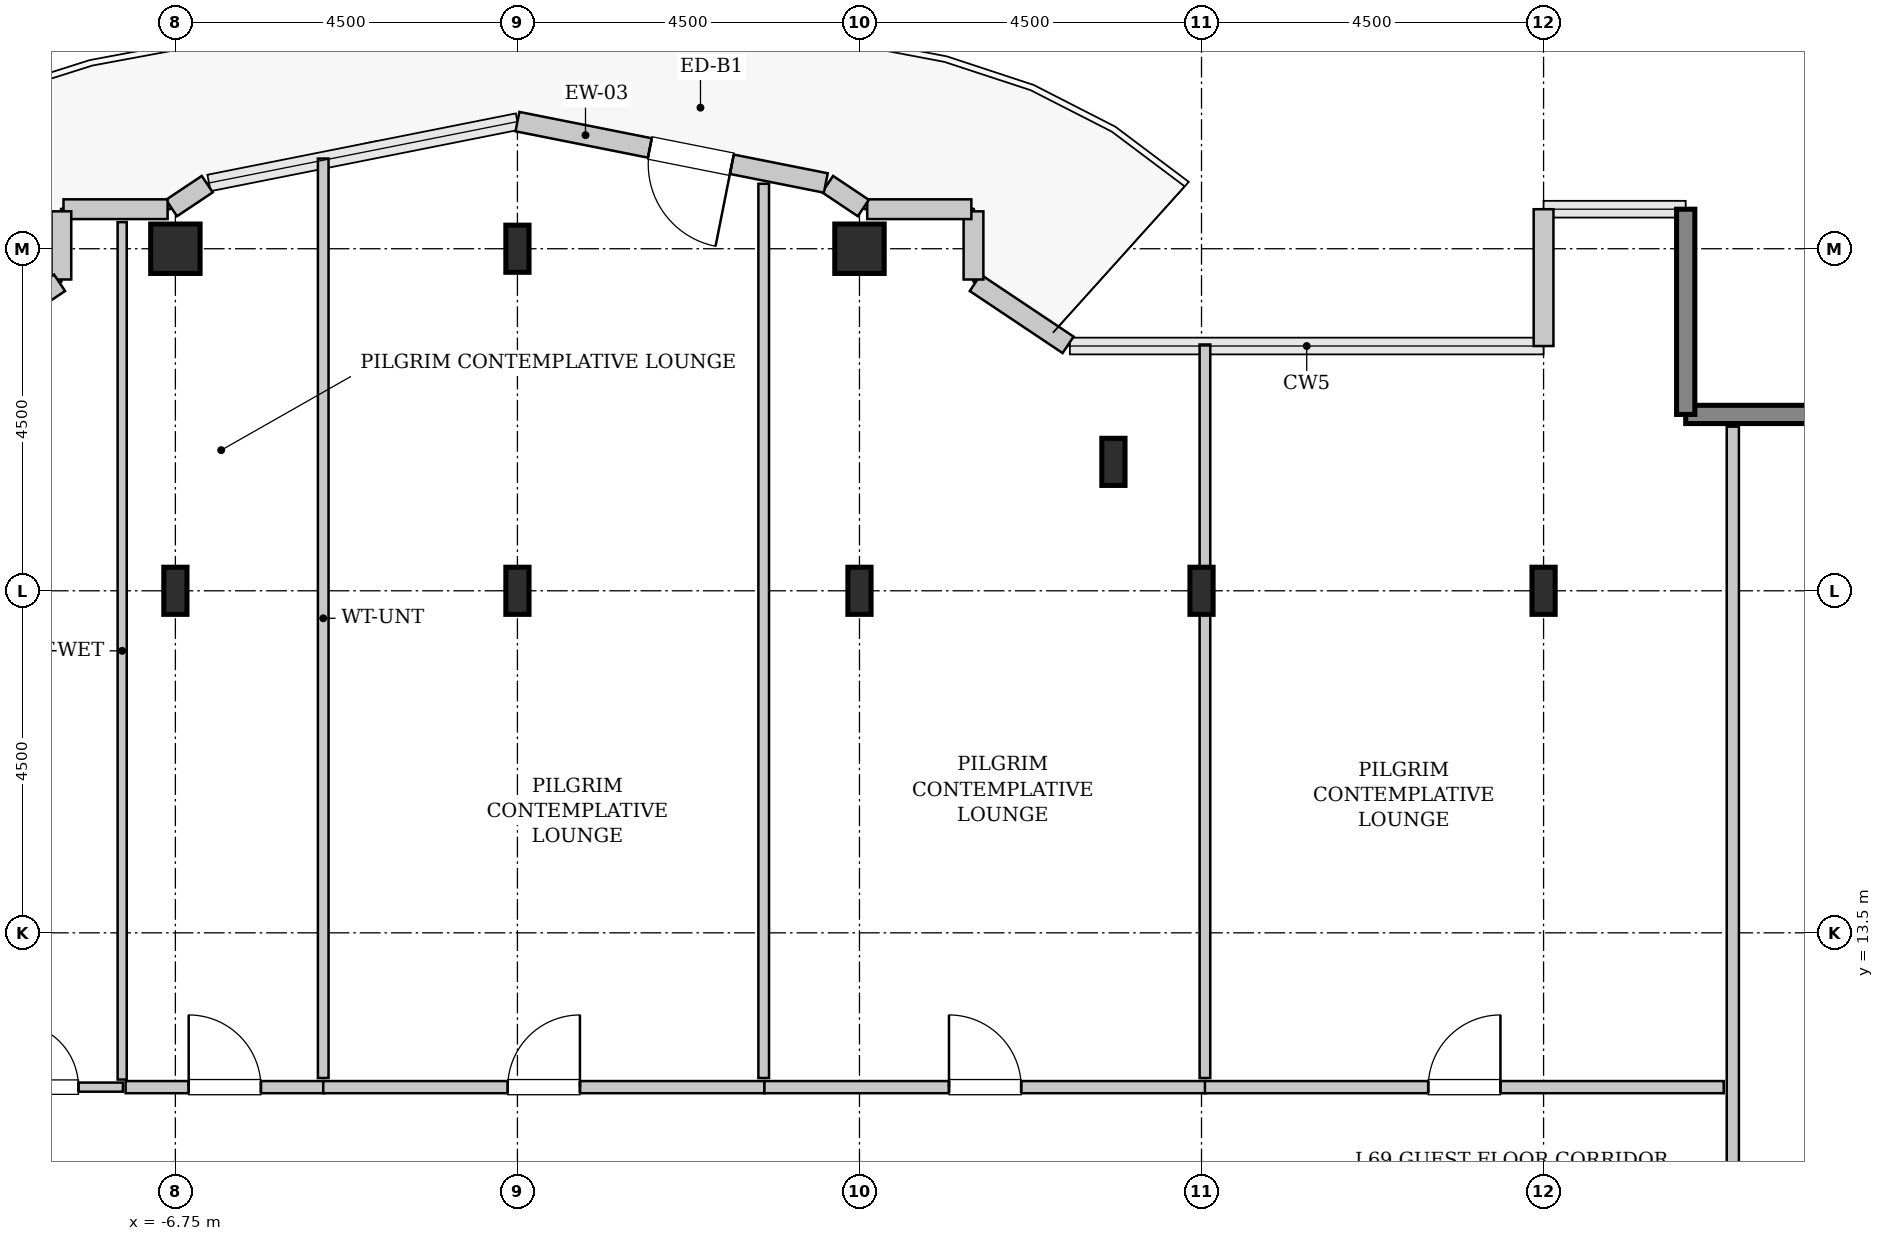
"""IFC4 building model, lengths in metres.
Left out: names, types, materials, properties, quantities, classifications, styles, units other than length and angle.
Written with IfcOpenShell. Run it as: python <this file> out.ifc"""

import sys

from ifc_helpers import new_model, si_unit, direction, frame, frame_2d, origin, origin_2d, place, context, subcontext, project, spatial, rectangle, hollow_rectangle, i_section, extrude, source, transform, mapped, element, fill, save


model = new_model("IFC4")
c1 = context("Model", 3, precision=1e-05, world=origin(), true_north=direction((0.0, 1.0)))
c2 = subcontext(c1, "Body", "Model", "MODEL_VIEW")
j1 = project(units=[si_unit("LENGTHUNIT", "METRE"), si_unit("PLANEANGLEUNIT", "RADIAN")], contexts=[c1])
p1 = place(None, origin())
s1 = spatial("IfcSite", under=j1, at=p1, CompositionType="ELEMENT")
p2 = place(p1, origin())
s2 = spatial("IfcBuilding", under=s1, at=p2, CompositionType="ELEMENT")
p3 = place(p2, frame((0.0, 0.0, 276.0)))
s3 = spatial("IfcBuildingStorey", under=s2, at=p3, CompositionType="ELEMENT", Elevation=276.0)
m1 = source(origin(), c2, "Body", "SweptSolid", [
    extrude(i_section(OverallWidth=0.305, OverallDepth=0.62, WebThickness=0.021, FlangeThickness=0.04, FilletRadius=0.027, at=origin_2d()), origin(), (0.0, 0.0, 1.0), 3.8),
])
p4 = place(p3, frame((-6.75, 18.0, 0.0), z_axis=(0.0, 0.0, 1.0), x_axis=(1.0, 0.0, 0.0)))
e1 = element("IfcColumn", 1, at=p4, inside=s3, PredefinedType="COLUMN", context=c2, shape_type="MappedRepresentation", body=[
    mapped(m1, transform((0.0, 0.0, 0.0), x_axis=(1.0, 0.0, 0.0), y_axis=(0.0, 1.0, 0.0), z_axis=(0.0, 0.0, 1.0), scale=1.0)),
])
m2 = source(origin(), c2, "Body", "SweptSolid", [
    extrude(hollow_rectangle(XDim=0.65, YDim=0.65, WallThickness=0.032, InnerFilletRadius=0.032, OuterFilletRadius=0.064, at=origin_2d()), origin(), (0.0, 0.0, 1.0), 3.8),
])
p5 = place(p3, frame((-6.75, 22.5, 0.0), z_axis=(0.0, 0.0, 1.0), x_axis=(1.0, 0.0, 0.0)))
e2 = element("IfcColumn", 2, at=p5, inside=s3, PredefinedType="COLUMN", context=c2, shape_type="MappedRepresentation", body=[
    mapped(m2, transform((0.0, 0.0, 0.0), x_axis=(1.0, 0.0, 0.0), y_axis=(0.0, 1.0, 0.0), z_axis=(0.0, 0.0, 1.0), scale=1.0)),
])
for number, where, z_axis, x_axis in (
    (3, (-2.25, 18.0, 0.0), (0.0, 0.0, 1.0), (1.0, 0.0, 0.0)),
    (4, (-2.25, 22.5, 0.0), (0.0, 0.0, 1.0), (1.0, 0.0, 0.0)),
    (5, (2.25, 18.0, 0.0), (0.0, 0.0, 1.0), (1.0, 0.0, 0.0)),
):
    element("IfcColumn", number, at=place(p3, frame(where, z_axis=z_axis, x_axis=x_axis)), inside=s3, PredefinedType="COLUMN", context=c2, shape_type="MappedRepresentation", body=[
        mapped(m1, transform((0.0, 0.0, 0.0), x_axis=(1.0, 0.0, 0.0), y_axis=(0.0, 1.0, 0.0), z_axis=(0.0, 0.0, 1.0), scale=1.0)),
    ])
p6 = place(p3, frame((2.25, 22.5, 0.0), z_axis=(0.0, 0.0, 1.0), x_axis=(1.0, 0.0, 0.0)))
e6 = element("IfcColumn", 6, at=p6, inside=s3, PredefinedType="COLUMN", context=c2, shape_type="MappedRepresentation", body=[
    mapped(m2, transform((0.0, 0.0, 0.0), x_axis=(1.0, 0.0, 0.0), y_axis=(0.0, 1.0, 0.0), z_axis=(0.0, 0.0, 1.0), scale=1.0)),
])
for number, where, z_axis, x_axis in (
    (7, (5.591, 19.696, 0.0), (0.0, 0.0, 1.0), (1.0, 0.0, 0.0)),
    (8, (6.75, 18.0, 0.0), (0.0, 0.0, 1.0), (1.0, 0.0, 0.0)),
    (9, (11.25, 18.0, 0.0), (0.0, 0.0, 1.0), (1.0, 0.0, 0.0)),
):
    element("IfcColumn", number, at=place(p3, frame(where, z_axis=z_axis, x_axis=x_axis)), inside=s3, PredefinedType="COLUMN", context=c2, shape_type="MappedRepresentation", body=[
        mapped(m1, transform((0.0, 0.0, 0.0), x_axis=(1.0, 0.0, 0.0), y_axis=(0.0, 1.0, 0.0), z_axis=(0.0, 0.0, 1.0), scale=1.0)),
    ])
m3 = source(origin(), c2, "Body", "SweptSolid", [
    extrude(rectangle(XDim=2.7, YDim=0.24, at=frame_2d((1.35, 0.0))), origin(), (0.0, 0.0, 1.0), 3.55),
])
for number, where, z_axis, x_axis in (
    (10, (15.82, 20.32, 0.0), (0.0, 0.0, 1.0), (-1.0, 0.0, 0.0)),
    (11, (13.12, 20.32, 0.0), (0.0, 0.0, 1.0), (0.0, 1.0, 0.0)),
):
    element("IfcWall", number, at=place(p3, frame(where, z_axis=z_axis, x_axis=x_axis)), inside=s3, PredefinedType="SHEAR", context=c2, shape_type="MappedRepresentation", body=[
        mapped(m3, transform((0.0, 0.0, 0.0), x_axis=(1.0, 0.0, 0.0), y_axis=(0.0, 1.0, 0.0), z_axis=(0.0, 0.0, 1.0), scale=1.0)),
    ])
m4 = source(origin(), c2, "Body", "SweptSolid", [
    extrude(rectangle(XDim=1.8, YDim=0.26, at=frame_2d((0.9, 0.0))), origin(), (0.0, 0.0, 1.0), 3.55),
])
p7 = place(p3, frame((11.25, 23.02, 0.0), z_axis=(0.0, 0.0, 1.0), x_axis=(0.0, -1.0, 0.0)))
e12 = element("IfcWall", 12, at=p7, inside=s3, PredefinedType="SOLIDWALL", context=c2, shape_type="MappedRepresentation", body=[
    mapped(m4, transform((0.0, 0.0, 0.0), x_axis=(1.0, 0.0, 0.0), y_axis=(0.0, 1.0, 0.0), z_axis=(0.0, 0.0, 1.0), scale=1.0)),
])
m5 = source(origin(), c2, "Body", "SweptSolid", [
    extrude(rectangle(XDim=1.469, YDim=0.26, at=frame_2d((0.734, 0.0))), origin(), (0.0, 0.0, 1.0), 3.55),
])
p8 = place(p3, frame((4.995, 21.236, 0.0), z_axis=(0.0, 0.0, 1.0), x_axis=(-0.831461760506, 0.555581983884, 0.0)))
e13 = element("IfcWall", 13, at=p8, inside=s3, PredefinedType="SOLIDWALL", context=c2, shape_type="MappedRepresentation", body=[
    mapped(m5, transform((0.0, 0.0, 0.0), x_axis=(1.0, 0.0, 0.0), y_axis=(0.0, 1.0, 0.0), z_axis=(0.0, 0.0, 1.0), scale=1.0)),
])
m6 = source(origin(), c2, "Body", "SweptSolid", [
    extrude(rectangle(XDim=0.897, YDim=0.26, at=frame_2d((0.448, 0.0))), origin(), (0.0, 0.0, 1.0), 3.55),
])
p9 = place(p3, frame((3.75, 22.095, 0.0), z_axis=(0.0, 0.0, 1.0), x_axis=(0.0, 1.0, 0.0)))
e14 = element("IfcWall", 14, at=p9, inside=s3, PredefinedType="SOLIDWALL", context=c2, shape_type="MappedRepresentation", body=[
    mapped(m6, transform((0.0, 0.0, 0.0), x_axis=(1.0, 0.0, 0.0), y_axis=(0.0, 1.0, 0.0), z_axis=(0.0, 0.0, 1.0), scale=1.0)),
])
m7 = source(origin(), c2, "Body", "SweptSolid", [
    extrude(rectangle(XDim=1.37, YDim=0.26, at=frame_2d((0.685, 0.0))), origin(), (0.0, 0.0, 1.0), 3.55),
])
p10 = place(p3, frame((3.722, 23.02, 0.0), z_axis=(0.0, 0.0, 1.0), x_axis=(-1.0, 0.0, 0.0)))
e15 = element("IfcWall", 15, at=p10, inside=s3, PredefinedType="SOLIDWALL", context=c2, shape_type="MappedRepresentation", body=[
    mapped(m7, transform((0.0, 0.0, 0.0), x_axis=(1.0, 0.0, 0.0), y_axis=(0.0, 1.0, 0.0), z_axis=(0.0, 0.0, 1.0), scale=1.0)),
])
m8 = source(origin(), c2, "Body", "SweptSolid", [
    extrude(rectangle(XDim=0.565, YDim=0.26, at=frame_2d((0.283, 0.0))), origin(), (0.0, 0.0, 1.0), 3.55),
])
p11 = place(p3, frame((2.301, 23.036, 0.0), z_axis=(0.0, 0.0, 1.0), x_axis=(-0.831651492666, 0.555297933317, 0.0)))
e16 = element("IfcWall", 16, at=p11, inside=s3, PredefinedType="SOLIDWALL", context=c2, shape_type="MappedRepresentation", body=[
    mapped(m8, transform((0.0, 0.0, 0.0), x_axis=(1.0, 0.0, 0.0), y_axis=(0.0, 1.0, 0.0), z_axis=(0.0, 0.0, 1.0), scale=1.0)),
])
m9 = source(origin(), c2, "Body", "SweptSolid", [
    extrude(rectangle(XDim=4.137, YDim=0.26, at=frame_2d((2.068, 0.0))), origin(), (0.0, 0.0, 1.0), 3.55),
])
p12 = place(p3, frame((1.807, 23.365, 0.0), z_axis=(0.0, 0.0, 1.0), x_axis=(-0.980782170794, 0.195105954428, 0.0)))
e17 = element("IfcWall", 17, at=p12, inside=s3, PredefinedType="SOLIDWALL", context=c2, shape_type="MappedRepresentation", body=[
    mapped(m9, transform((0.0, 0.0, 0.0), x_axis=(1.0, 0.0, 0.0), y_axis=(0.0, 1.0, 0.0), z_axis=(0.0, 0.0, 1.0), scale=1.0)),
])
p13 = place(p12, frame((1.261, 0.0, 0.0)))
e18 = element("IfcOpeningElement", 18, at=p13, cuts=e17, PredefinedType="OPENING", context=c2, shape_type="SweptSolid", body=[
    extrude(rectangle(XDim=1.1, YDim=2.2, at=frame_2d((0.55, 1.1))), frame((0.0, 0.14, 0.0), z_axis=(0.0, -1.0, 0.0), x_axis=(1.0, 0.0, 0.0)), (0.0, 0.0, 1.0), 0.28),
])
p14 = place(p3, frame((-6.331, 23.35, 0.0), z_axis=(0.0, 0.0, 1.0), x_axis=(-0.831651492666, -0.555297933317, 0.0)))
e19 = element("IfcWall", 19, at=p14, inside=s3, PredefinedType="SOLIDWALL", context=c2, shape_type="MappedRepresentation", body=[
    mapped(m8, transform((0.0, 0.0, 0.0), x_axis=(1.0, 0.0, 0.0), y_axis=(0.0, 1.0, 0.0), z_axis=(0.0, 0.0, 1.0), scale=1.0)),
])
p15 = place(p3, frame((-6.852, 23.02, 0.0), z_axis=(0.0, 0.0, 1.0), x_axis=(-1.0, 0.0, 0.0)))
e20 = element("IfcWall", 20, at=p15, inside=s3, PredefinedType="SOLIDWALL", context=c2, shape_type="MappedRepresentation", body=[
    mapped(m7, transform((0.0, 0.0, 0.0), x_axis=(1.0, 0.0, 0.0), y_axis=(0.0, 1.0, 0.0), z_axis=(0.0, 0.0, 1.0), scale=1.0)),
])
p16 = place(p3, frame((-8.25, 22.992, 0.0), z_axis=(0.0, 0.0, 1.0), x_axis=(0.0, -1.0, 0.0)))
e21 = element("IfcWall", 21, at=p16, inside=s3, PredefinedType="SOLIDWALL", context=c2, shape_type="MappedRepresentation", body=[
    mapped(m6, transform((0.0, 0.0, 0.0), x_axis=(1.0, 0.0, 0.0), y_axis=(0.0, 1.0, 0.0), z_axis=(0.0, 0.0, 1.0), scale=1.0)),
])
p17 = place(p3, frame((-8.273, 22.052, 0.0), z_axis=(0.0, 0.0, 1.0), x_axis=(-0.831461760506, -0.555581983884, 0.0)))
e22 = element("IfcWall", 22, at=p17, inside=s3, PredefinedType="SOLIDWALL", context=c2, shape_type="MappedRepresentation", body=[
    mapped(m5, transform((0.0, 0.0, 0.0), x_axis=(1.0, 0.0, 0.0), y_axis=(0.0, 1.0, 0.0), z_axis=(0.0, 0.0, 1.0), scale=1.0)),
])
m10 = source(origin(), c2, "Body", "SweptSolid", [
    extrude(rectangle(XDim=2.02, YDim=0.12, at=frame_2d((1.01, 0.0))), origin(), (0.0, 0.0, 1.0), 3.535),
])
p18 = place(p3, frame((-9.46, 11.47, 0.0), z_axis=(0.0, 0.0, 1.0), x_axis=(1.0, 0.0, 0.0)))
e23 = element("IfcWall", 23, at=p18, inside=s3, PredefinedType="PLUMBINGWALL", context=c2, shape_type="MappedRepresentation", body=[
    mapped(m10, transform((0.0, 0.0, 0.0), x_axis=(1.0, 0.0, 0.0), y_axis=(0.0, 1.0, 0.0), z_axis=(0.0, 0.0, 1.0), scale=1.0)),
])
p19 = place(p18, frame((0.585, 0.0, 0.0)))
e24 = element("IfcOpeningElement", 24, at=p19, cuts=e23, PredefinedType="OPENING", context=c2, shape_type="SweptSolid", body=[
    extrude(rectangle(XDim=0.85, YDim=2.1, at=frame_2d((0.425, 1.05))), frame((0.0, 0.07, 0.0), z_axis=(0.0, -1.0, 0.0), x_axis=(1.0, 0.0, 0.0)), (0.0, 0.0, 1.0), 0.14),
])
m11 = source(origin(), c2, "Body", "SweptSolid", [
    extrude(rectangle(XDim=11.28, YDim=0.12, at=frame_2d((5.64, 0.0))), origin(), (0.0, 0.0, 1.0), 3.535),
])
p20 = place(p3, frame((-7.45, 11.57, 0.0), z_axis=(0.0, 0.0, 1.0), x_axis=(0.0, 1.0, 0.0)))
e25 = element("IfcWall", 25, at=p20, inside=s3, PredefinedType="PLUMBINGWALL", context=c2, shape_type="MappedRepresentation", body=[
    mapped(m11, transform((0.0, 0.0, 0.0), x_axis=(1.0, 0.0, 0.0), y_axis=(0.0, 1.0, 0.0), z_axis=(0.0, 0.0, 1.0), scale=1.0)),
])
m12 = source(origin(), c2, "Body", "SweptSolid", [
    extrude(rectangle(XDim=13.965, YDim=0.16, at=frame_2d((6.982, 0.0))), origin(), (0.0, 0.0, 1.0), 3.535),
])
p21 = place(p3, frame((13.74, 6.195, 0.0), z_axis=(0.0, 0.0, 1.0), x_axis=(0.0, 1.0, 0.0)))
e26 = element("IfcWall", 26, at=p21, inside=s3, PredefinedType="PARTITIONING", context=c2, shape_type="MappedRepresentation", body=[
    mapped(m12, transform((0.0, 0.0, 0.0), x_axis=(1.0, 0.0, 0.0), y_axis=(0.0, 1.0, 0.0), z_axis=(0.0, 0.0, 1.0), scale=1.0)),
])
p22 = place(p21, frame((2.183, 0.0, 0.0)))
e27 = element("IfcOpeningElement", 27, at=p22, cuts=e26, PredefinedType="OPENING", context=c2, shape_type="SweptSolid", body=[
    extrude(rectangle(XDim=0.95, YDim=2.1, at=frame_2d((0.475, 1.05))), frame((0.0, 0.09, 0.0), z_axis=(0.0, -1.0, 0.0), x_axis=(1.0, 0.0, 0.0)), (0.0, 0.0, 1.0), 0.18),
])
m13 = source(origin(), c2, "Body", "SweptSolid", [
    extrude(rectangle(XDim=2.61, YDim=0.16, at=frame_2d((1.305, 0.0))), origin(), (0.0, 0.0, 1.0), 3.535),
])
p23 = place(p3, frame((-7.405, 11.47, 0.0), z_axis=(0.0, 0.0, 1.0), x_axis=(1.0, 0.0, 0.0)))
e28 = element("IfcWall", 28, at=p23, inside=s3, PredefinedType="PARTITIONING", context=c2, shape_type="MappedRepresentation", body=[
    mapped(m13, transform((0.0, 0.0, 0.0), x_axis=(1.0, 0.0, 0.0), y_axis=(0.0, 1.0, 0.0), z_axis=(0.0, 0.0, 1.0), scale=1.0)),
])
p24 = place(p23, frame((0.83, 0.0, 0.0)))
e29 = element("IfcOpeningElement", 29, at=p24, cuts=e28, PredefinedType="OPENING", context=c2, shape_type="SweptSolid", body=[
    extrude(rectangle(XDim=0.95, YDim=2.1, at=frame_2d((0.475, 1.05))), frame((0.0, 0.09, 0.0), z_axis=(0.0, -1.0, 0.0), x_axis=(1.0, 0.0, 0.0)), (0.0, 0.0, 1.0), 0.18),
])
m14 = source(origin(), c2, "Body", "SweptSolid", [
    extrude(rectangle(XDim=12.096, YDim=0.14, at=frame_2d((6.048, 0.0))), origin(), (0.0, 0.0, 1.0), 3.535),
])
p25 = place(p3, frame((-4.805, 11.59, 0.0), z_axis=(0.0, 0.0, 1.0), x_axis=(0.0, 1.0, 0.0)))
e30 = element("IfcWall", 30, at=p25, inside=s3, PredefinedType="PARTITIONING", context=c2, shape_type="MappedRepresentation", body=[
    mapped(m14, transform((0.0, 0.0, 0.0), x_axis=(1.0, 0.0, 0.0), y_axis=(0.0, 1.0, 0.0), z_axis=(0.0, 0.0, 1.0), scale=1.0)),
])
m15 = source(origin(), c2, "Body", "SweptSolid", [
    extrude(rectangle(XDim=5.805, YDim=0.16, at=frame_2d((2.902, 0.0))), origin(), (0.0, 0.0, 1.0), 3.535),
])
p26 = place(p3, frame((-4.805, 11.47, 0.0), z_axis=(0.0, 0.0, 1.0), x_axis=(1.0, 0.0, 0.0)))
e31 = element("IfcWall", 31, at=p26, inside=s3, PredefinedType="PARTITIONING", context=c2, shape_type="MappedRepresentation", body=[
    mapped(m15, transform((0.0, 0.0, 0.0), x_axis=(1.0, 0.0, 0.0), y_axis=(0.0, 1.0, 0.0), z_axis=(0.0, 0.0, 1.0), scale=1.0)),
])
p27 = place(p26, frame((2.427, 0.0, 0.0)))
e32 = element("IfcOpeningElement", 32, at=p27, cuts=e31, PredefinedType="OPENING", context=c2, shape_type="SweptSolid", body=[
    extrude(rectangle(XDim=0.95, YDim=2.1, at=frame_2d((0.475, 1.05))), frame((0.0, 0.09, 0.0), z_axis=(0.0, -1.0, 0.0), x_axis=(1.0, 0.0, 0.0)), (0.0, 0.0, 1.0), 0.18),
])
m16 = source(origin(), c2, "Body", "SweptSolid", [
    extrude(rectangle(XDim=11.765, YDim=0.14, at=frame_2d((5.882, 0.0))), origin(), (0.0, 0.0, 1.0), 3.535),
])
p28 = place(p3, frame((0.99, 11.59, 0.0), z_axis=(0.0, 0.0, 1.0), x_axis=(0.0, 1.0, 0.0)))
e33 = element("IfcWall", 33, at=p28, inside=s3, PredefinedType="PARTITIONING", context=c2, shape_type="MappedRepresentation", body=[
    mapped(m16, transform((0.0, 0.0, 0.0), x_axis=(1.0, 0.0, 0.0), y_axis=(0.0, 1.0, 0.0), z_axis=(0.0, 0.0, 1.0), scale=1.0)),
])
p29 = place(p3, frame((1.0, 11.47, 0.0), z_axis=(0.0, 0.0, 1.0), x_axis=(1.0, 0.0, 0.0)))
e34 = element("IfcWall", 34, at=p29, inside=s3, PredefinedType="PARTITIONING", context=c2, shape_type="MappedRepresentation", body=[
    mapped(m15, transform((0.0, 0.0, 0.0), x_axis=(1.0, 0.0, 0.0), y_axis=(0.0, 1.0, 0.0), z_axis=(0.0, 0.0, 1.0), scale=1.0)),
])
p30 = place(p29, frame((2.427, 0.0, 0.0)))
e35 = element("IfcOpeningElement", 35, at=p30, cuts=e34, PredefinedType="OPENING", context=c2, shape_type="SweptSolid", body=[
    extrude(rectangle(XDim=0.95, YDim=2.1, at=frame_2d((0.475, 1.05))), frame((0.0, 0.09, 0.0), z_axis=(0.0, -1.0, 0.0), x_axis=(1.0, 0.0, 0.0)), (0.0, 0.0, 1.0), 0.18),
])
m17 = source(origin(), c2, "Body", "SweptSolid", [
    extrude(rectangle(XDim=9.65, YDim=0.14, at=frame_2d((4.825, 0.0))), origin(), (0.0, 0.0, 1.0), 3.535),
])
p31 = place(p3, frame((6.795, 11.59, 0.0), z_axis=(0.0, 0.0, 1.0), x_axis=(0.0, 1.0, 0.0)))
e36 = element("IfcWall", 36, at=p31, inside=s3, PredefinedType="PARTITIONING", context=c2, shape_type="MappedRepresentation", body=[
    mapped(m17, transform((0.0, 0.0, 0.0), x_axis=(1.0, 0.0, 0.0), y_axis=(0.0, 1.0, 0.0), z_axis=(0.0, 0.0, 1.0), scale=1.0)),
])
m18 = source(origin(), c2, "Body", "SweptSolid", [
    extrude(rectangle(XDim=6.825, YDim=0.16, at=frame_2d((3.413, 0.0))), origin(), (0.0, 0.0, 1.0), 3.535),
])
p32 = place(p3, frame((6.795, 11.47, 0.0), z_axis=(0.0, 0.0, 1.0), x_axis=(1.0, 0.0, 0.0)))
e37 = element("IfcWall", 37, at=p32, inside=s3, PredefinedType="PARTITIONING", context=c2, shape_type="MappedRepresentation", body=[
    mapped(m18, transform((0.0, 0.0, 0.0), x_axis=(1.0, 0.0, 0.0), y_axis=(0.0, 1.0, 0.0), z_axis=(0.0, 0.0, 1.0), scale=1.0)),
])
p33 = place(p32, frame((2.938, 0.0, 0.0)))
e38 = element("IfcOpeningElement", 38, at=p33, cuts=e37, PredefinedType="OPENING", context=c2, shape_type="SweptSolid", body=[
    extrude(rectangle(XDim=0.95, YDim=2.1, at=frame_2d((0.475, 1.05))), frame((0.0, 0.09, 0.0), z_axis=(0.0, -1.0, 0.0), x_axis=(1.0, 0.0, 0.0)), (0.0, 0.0, 1.0), 0.18),
])
m19 = source(origin(), c2, "Body", "SweptSolid", [
    extrude(rectangle(XDim=1.1, YDim=2.2, at=frame_2d((0.55, 1.1))), frame((0.0, 0.025, 0.0), z_axis=(0.0, -1.0, 0.0), x_axis=(1.0, 0.0, 0.0)), (0.0, 0.0, 1.0), 0.05),
])
p34 = place(p13, origin())
e39 = element("IfcDoor", 39, at=p34, inside=s3, OperationType="SINGLE_SWING_LEFT", PredefinedType="DOOR", context=c2, shape_type="MappedRepresentation", body=[
    mapped(m19, transform((0.0, 0.0, 0.0), x_axis=(1.0, 0.0, 0.0), y_axis=(0.0, 1.0, 0.0), z_axis=(0.0, 0.0, 1.0), scale=1.0)),
])
fill(e18, e39)
m20 = source(origin(), c2, "Body", "SweptSolid", [
    extrude(rectangle(XDim=0.85, YDim=2.1, at=frame_2d((0.425, 1.05))), frame((0.0, 0.025, 0.0), z_axis=(0.0, -1.0, 0.0), x_axis=(1.0, 0.0, 0.0)), (0.0, 0.0, 1.0), 0.05),
])
p35 = place(p19, origin())
e40 = element("IfcDoor", 40, at=p35, inside=s3, OperationType="SINGLE_SWING_LEFT", PredefinedType="DOOR", context=c2, shape_type="MappedRepresentation", body=[
    mapped(m20, transform((0.0, 0.0, 0.0), x_axis=(1.0, 0.0, 0.0), y_axis=(0.0, 1.0, 0.0), z_axis=(0.0, 0.0, 1.0), scale=1.0)),
])
fill(e24, e40)
m21 = source(origin(), c2, "Body", "SweptSolid", [
    extrude(rectangle(XDim=0.95, YDim=2.1, at=frame_2d((0.475, 1.05))), frame((0.0, 0.025, 0.0), z_axis=(0.0, -1.0, 0.0), x_axis=(1.0, 0.0, 0.0)), (0.0, 0.0, 1.0), 0.05),
])
p36 = place(p24, origin())
e41 = element("IfcDoor", 41, at=p36, inside=s3, OperationType="SINGLE_SWING_LEFT", PredefinedType="DOOR", context=c2, shape_type="MappedRepresentation", body=[
    mapped(m21, transform((0.0, 0.0, 0.0), x_axis=(1.0, 0.0, 0.0), y_axis=(0.0, 1.0, 0.0), z_axis=(0.0, 0.0, 1.0), scale=1.0)),
])
fill(e29, e41)
p37 = place(p27, origin())
e42 = element("IfcDoor", 42, at=p37, inside=s3, OperationType="SINGLE_SWING_RIGHT", PredefinedType="DOOR", context=c2, shape_type="MappedRepresentation", body=[
    mapped(m21, transform((0.0, 0.0, 0.0), x_axis=(1.0, 0.0, 0.0), y_axis=(0.0, 1.0, 0.0), z_axis=(0.0, 0.0, 1.0), scale=1.0)),
])
fill(e32, e42)
p38 = place(p30, origin())
e43 = element("IfcDoor", 43, at=p38, inside=s3, OperationType="SINGLE_SWING_LEFT", PredefinedType="DOOR", context=c2, shape_type="MappedRepresentation", body=[
    mapped(m21, transform((0.0, 0.0, 0.0), x_axis=(1.0, 0.0, 0.0), y_axis=(0.0, 1.0, 0.0), z_axis=(0.0, 0.0, 1.0), scale=1.0)),
])
fill(e35, e43)
p39 = place(p33, origin())
e44 = element("IfcDoor", 44, at=p39, inside=s3, OperationType="SINGLE_SWING_RIGHT", PredefinedType="DOOR", context=c2, shape_type="MappedRepresentation", body=[
    mapped(m21, transform((0.0, 0.0, 0.0), x_axis=(1.0, 0.0, 0.0), y_axis=(0.0, 1.0, 0.0), z_axis=(0.0, 0.0, 1.0), scale=1.0)),
])
fill(e38, e44)
save(model, sys.argv[1])
